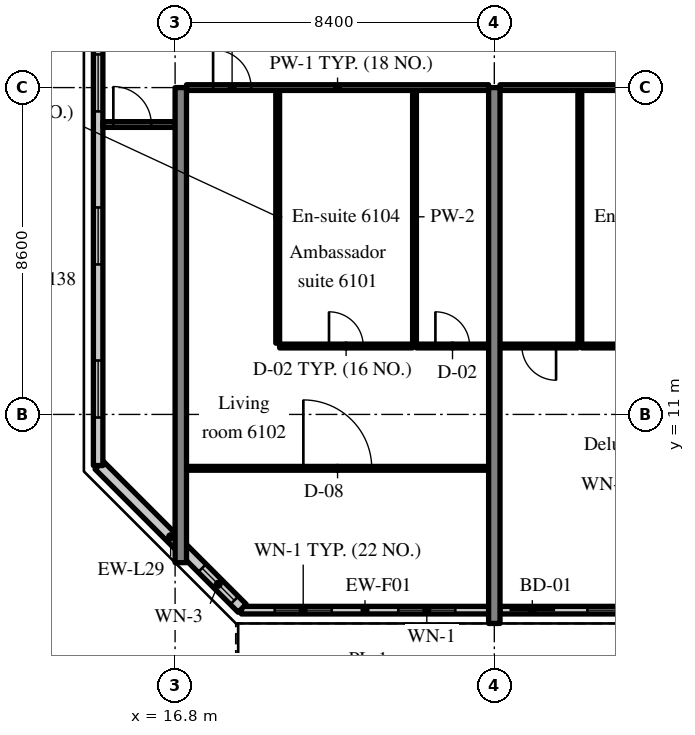
"""IFC4 building model, lengths in metres.
Left out: names, types, materials, properties, quantities, classifications, styles, units other than length and angle.
Written with IfcOpenShell. Run it as: python <this file> out.ifc"""

import sys

from ifc_helpers import new_model, si_unit, direction, frame, frame_2d, origin, place, context, subcontext, project, spatial, rectangle, extrude, source, transform, mapped, element, fill, save


model = new_model("IFC4")
c1 = context("Model", 3, precision=1e-05, world=origin(), true_north=direction((0.0, 1.0)))
c2 = subcontext(c1, "Body", "Model", "MODEL_VIEW")
j1 = project(units=[si_unit("LENGTHUNIT", "METRE"), si_unit("PLANEANGLEUNIT", "RADIAN")], contexts=[c1])
p1 = place(None, origin())
s1 = spatial("IfcSite", under=j1, at=p1, CompositionType="ELEMENT")
p2 = place(p1, origin())
s2 = spatial("IfcBuilding", under=s1, at=p2, CompositionType="ELEMENT")
p3 = place(p2, frame((0.0, 0.0, 253.0)))
s3 = spatial("IfcBuildingStorey", under=s2, at=p3, CompositionType="ELEMENT", Elevation=253.0)
m1 = source(origin(), c2, "Body", "SweptSolid", [
    extrude(rectangle(XDim=12.5, YDim=0.3, at=frame_2d((6.25, 0.0))), origin(), (0.0, 0.0, 1.0), 3.62),
])
p4 = place(p3, frame((16.95, 7.1, 0.0), z_axis=(0.0, 0.0, 1.0), x_axis=(0.0, 1.0, 0.0)))
e1 = element("IfcWall", 1, at=p4, inside=s3, PredefinedType="SHEAR", context=c2, shape_type="MappedRepresentation", body=[
    mapped(m1, transform((0.0, 0.0, 0.0), scale=1.0)),
])
m2 = source(origin(), c2, "Body", "SweptSolid", [
    extrude(rectangle(XDim=14.1, YDim=0.3, at=frame_2d((7.05, 0.0))), origin(), (0.0, 0.0, 1.0), 3.62),
])
p5 = place(p3, frame((25.2, 5.5, 0.0), z_axis=(0.0, 0.0, 1.0), x_axis=(0.0, 1.0, 0.0)))
e2 = element("IfcWall", 2, at=p5, inside=s3, PredefinedType="SHEAR", context=c2, shape_type="MappedRepresentation", body=[
    mapped(m2, transform((0.0, 0.0, 0.0), scale=1.0)),
])
m3 = source(origin(), c2, "Body", "SweptSolid", [
    extrude(rectangle(XDim=6.505, YDim=0.2, at=frame_2d((3.252, 0.0))), origin(), (0.0, 0.0, 1.0), 3.02),
])
p6 = place(p3, frame((18.545, 5.85, 0.0), z_axis=(0.0, 0.0, 1.0), x_axis=(1.0, 0.0, 0.0)))
e3 = element("IfcWall", 3, at=p6, inside=s3, PredefinedType="SOLIDWALL", context=c2, shape_type="MappedRepresentation", body=[
    mapped(m3, transform((0.0, 0.0, 0.0), scale=1.0)),
])
m4 = source(origin(), c2, "Body", "SweptSolid", [
    extrude(rectangle(XDim=1.5, YDim=1.5, at=frame_2d((0.75, 0.75))), frame((0.0, 0.11, 0.0), z_axis=(0.0, -1.0, 0.0), x_axis=(1.0, 0.0, 0.0)), (0.0, 0.0, 1.0), 0.22),
])
p7 = place(p6, frame((0.876, 0.0, 0.9)))
e4 = element("IfcOpeningElement", 4, at=p7, cuts=e3, PredefinedType="OPENING", context=c2, shape_type="MappedRepresentation", body=[
    mapped(m4, transform((0.0, 0.0, 0.0), scale=1.0)),
])
p8 = place(p6, frame((4.129, 0.0, 0.9)))
e5 = element("IfcOpeningElement", 5, at=p8, cuts=e3, PredefinedType="OPENING", context=c2, shape_type="MappedRepresentation", body=[
    mapped(m4, transform((0.0, 0.0, 0.0), scale=1.0)),
])
m5 = source(origin(), c2, "Body", "SweptSolid", [
    extrude(rectangle(XDim=8.1, YDim=0.2, at=frame_2d((4.05, 0.0))), origin(), (0.0, 0.0, 1.0), 3.02),
])
p9 = place(p3, frame((25.35, 5.85, 0.0), z_axis=(0.0, 0.0, 1.0), x_axis=(1.0, 0.0, 0.0)))
e6 = element("IfcWall", 6, at=p9, inside=s3, PredefinedType="SOLIDWALL", context=c2, shape_type="MappedRepresentation", body=[
    mapped(m5, transform((0.0, 0.0, 0.0), scale=1.0)),
])
m6 = source(origin(), c2, "Body", "SweptSolid", [
    extrude(rectangle(XDim=1.2, YDim=2.4, at=frame_2d((0.6, 1.2))), frame((0.0, 0.11, 0.0), z_axis=(0.0, -1.0, 0.0), x_axis=(1.0, 0.0, 0.0)), (0.0, 0.0, 1.0), 0.22),
])
p10 = place(p9, frame((0.25, 0.0, 0.0)))
e7 = element("IfcOpeningElement", 7, at=p10, cuts=e6, PredefinedType="OPENING", context=c2, shape_type="MappedRepresentation", body=[
    mapped(m6, transform((0.0, 0.0, 0.0), scale=1.0)),
])
p11 = place(p9, frame((2.3, 0.0, 0.9)))
e8 = element("IfcOpeningElement", 8, at=p11, cuts=e6, PredefinedType="OPENING", context=c2, shape_type="MappedRepresentation", body=[
    mapped(m4, transform((0.0, 0.0, 0.0), scale=1.0)),
])
p12 = place(p9, frame((4.3, 0.0, 0.0)))
e9 = element("IfcOpeningElement", 9, at=p12, cuts=e6, PredefinedType="OPENING", context=c2, shape_type="MappedRepresentation", body=[
    mapped(m6, transform((0.0, 0.0, 0.0), scale=1.0)),
])
p13 = place(p9, frame((6.35, 0.0, 0.9)))
e10 = element("IfcOpeningElement", 10, at=p13, cuts=e6, PredefinedType="OPENING", context=c2, shape_type="MappedRepresentation", body=[
    mapped(m4, transform((0.0, 0.0, 0.0), scale=1.0)),
])
m7 = source(origin(), c2, "Body", "SweptSolid", [
    extrude(rectangle(XDim=5.326, YDim=0.3, at=frame_2d((2.663, 0.0))), origin(), (0.0, 0.0, 1.0), 3.62),
])
p14 = place(p3, frame((14.8, 9.666, 0.0), z_axis=(0.0, 0.0, 1.0), x_axis=(0.707083859269, -0.707129702361, 0.0)))
e11 = element("IfcWall", 11, at=p14, inside=s3, PredefinedType="SOLIDWALL", context=c2, shape_type="MappedRepresentation", body=[
    mapped(m7, transform((0.0, 0.0, 0.0), scale=1.0)),
])
m8 = source(origin(), c2, "Body", "SweptSolid", [
    extrude(rectangle(XDim=1.2, YDim=1.5, at=frame_2d((0.6, 0.75))), frame((0.0, 0.16, 0.0), z_axis=(0.0, -1.0, 0.0), x_axis=(1.0, 0.0, 0.0)), (0.0, 0.0, 1.0), 0.32),
])
p15 = place(p14, frame((3.833, 0.0, 0.9)))
e12 = element("IfcOpeningElement", 12, at=p15, cuts=e11, PredefinedType="OPENING", context=c2, shape_type="MappedRepresentation", body=[
    mapped(m8, transform((0.0, 0.0, 0.0), scale=1.0)),
])
m9 = source(origin(), c2, "Body", "SweptSolid", [
    extrude(rectangle(XDim=28.189, YDim=0.25, at=frame_2d((14.095, 0.0))), origin(), (0.0, 0.0, 1.0), 3.62),
])
p16 = place(p3, frame((14.775, 37.845, 0.0), z_axis=(0.0, 0.0, 1.0), x_axis=(0.0, -1.0, 0.0)))
e13 = element("IfcWall", 13, at=p16, inside=s3, PredefinedType="SOLIDWALL", context=c2, shape_type="MappedRepresentation", body=[
    mapped(m9, transform((0.0, 0.0, 0.0), scale=1.0)),
])
m10 = source(origin(), c2, "Body", "SweptSolid", [
    extrude(rectangle(XDim=1.5, YDim=1.5, at=frame_2d((0.75, 0.75))), frame((0.0, 0.135, 0.0), z_axis=(0.0, -1.0, 0.0), x_axis=(1.0, 0.0, 0.0)), (0.0, 0.0, 1.0), 0.27),
])
p17 = place(p16, frame((1.263, 0.0, 0.9)))
e14 = element("IfcOpeningElement", 14, at=p17, cuts=e13, PredefinedType="OPENING", context=c2, shape_type="MappedRepresentation", body=[
    mapped(m10, transform((0.0, 0.0, 0.0), scale=1.0)),
])
p18 = place(p16, frame((5.291, 0.0, 0.9)))
e15 = element("IfcOpeningElement", 15, at=p18, cuts=e13, PredefinedType="OPENING", context=c2, shape_type="MappedRepresentation", body=[
    mapped(m10, transform((0.0, 0.0, 0.0), scale=1.0)),
])
p19 = place(p16, frame((9.318, 0.0, 0.9)))
e16 = element("IfcOpeningElement", 16, at=p19, cuts=e13, PredefinedType="OPENING", context=c2, shape_type="MappedRepresentation", body=[
    mapped(m10, transform((0.0, 0.0, 0.0), scale=1.0)),
])
p20 = place(p16, frame((13.345, 0.0, 0.9)))
e17 = element("IfcOpeningElement", 17, at=p20, cuts=e13, PredefinedType="OPENING", context=c2, shape_type="MappedRepresentation", body=[
    mapped(m10, transform((0.0, 0.0, 0.0), scale=1.0)),
])
p21 = place(p16, frame((17.372, 0.0, 0.9)))
e18 = element("IfcOpeningElement", 18, at=p21, cuts=e13, PredefinedType="OPENING", context=c2, shape_type="MappedRepresentation", body=[
    mapped(m10, transform((0.0, 0.0, 0.0), scale=1.0)),
])
p22 = place(p16, frame((21.399, 0.0, 0.9)))
e19 = element("IfcOpeningElement", 19, at=p22, cuts=e13, PredefinedType="OPENING", context=c2, shape_type="MappedRepresentation", body=[
    mapped(m10, transform((0.0, 0.0, 0.0), scale=1.0)),
])
p23 = place(p16, frame((25.426, 0.0, 0.9)))
e20 = element("IfcOpeningElement", 20, at=p23, cuts=e13, PredefinedType="OPENING", context=c2, shape_type="MappedRepresentation", body=[
    mapped(m10, transform((0.0, 0.0, 0.0), scale=1.0)),
])
m11 = source(origin(), c2, "Body", "SweptSolid", [
    extrude(rectangle(XDim=6.65, YDim=0.1, at=frame_2d((3.325, 0.0))), origin(), (0.0, 0.0, 1.0), 3.62),
])
for number, where, z_axis, x_axis in (
    (21, (19.5, 12.875, 0.0), (0.0, 0.0, 1.0), (0.0, 1.0, 0.0)),
    (22, (23.1, 12.875, 0.0), (0.0, 0.0, 1.0), (0.0, 1.0, 0.0)),
):
    element("IfcWall", number, at=place(p3, frame(where, z_axis=z_axis, x_axis=x_axis)), inside=s3, PredefinedType="PARTITIONING", context=c2, shape_type="MappedRepresentation", body=[
        mapped(m11, transform((0.0, 0.0, 0.0), scale=1.0)),
    ])
m12 = source(origin(), c2, "Body", "SweptSolid", [
    extrude(rectangle(XDim=3.5, YDim=0.1, at=frame_2d((1.75, 0.0))), origin(), (0.0, 0.0, 1.0), 3.62),
])
p24 = place(p3, frame((19.55, 12.8, 0.0), z_axis=(0.0, 0.0, 1.0), x_axis=(1.0, 0.0, 0.0)))
e23 = element("IfcWall", 23, at=p24, inside=s3, PredefinedType="PARTITIONING", context=c2, shape_type="MappedRepresentation", body=[
    mapped(m12, transform((0.0, 0.0, 0.0), scale=1.0)),
])
m13 = source(origin(), c2, "Body", "SweptSolid", [
    extrude(rectangle(XDim=0.9, YDim=2.1, at=frame_2d((0.45, 1.05))), frame((0.0, 0.06, 0.0), z_axis=(0.0, -1.0, 0.0), x_axis=(1.0, 0.0, 0.0)), (0.0, 0.0, 1.0), 0.12),
])
p25 = place(p24, frame((1.3, 0.0, 0.0)))
e24 = element("IfcOpeningElement", 24, at=p25, cuts=e23, PredefinedType="OPENING", context=c2, shape_type="MappedRepresentation", body=[
    mapped(m13, transform((0.0, 0.0, 0.0), scale=1.0)),
])
m14 = source(origin(), c2, "Body", "SweptSolid", [
    extrude(rectangle(XDim=1.9, YDim=0.1, at=frame_2d((0.95, 0.0))), origin(), (0.0, 0.0, 1.0), 3.62),
])
p26 = place(p3, frame((23.15, 12.8, 0.0), z_axis=(0.0, 0.0, 1.0), x_axis=(1.0, 0.0, 0.0)))
e25 = element("IfcWall", 25, at=p26, inside=s3, PredefinedType="PARTITIONING", context=c2, shape_type="MappedRepresentation", body=[
    mapped(m14, transform((0.0, 0.0, 0.0), scale=1.0)),
])
p27 = place(p26, frame((0.5, 0.0, 0.0)))
e26 = element("IfcOpeningElement", 26, at=p27, cuts=e25, PredefinedType="OPENING", context=c2, shape_type="MappedRepresentation", body=[
    mapped(m13, transform((0.0, 0.0, 0.0), scale=1.0)),
])
m15 = source(origin(), c2, "Body", "SweptSolid", [
    extrude(rectangle(XDim=7.95, YDim=0.1, at=frame_2d((3.975, 0.0))), origin(), (0.0, 0.0, 1.0), 3.62),
])
p28 = place(p3, frame((17.1, 9.582, 0.0), z_axis=(0.0, 0.0, 1.0), x_axis=(1.0, 0.0, 0.0)))
e27 = element("IfcWall", 27, at=p28, inside=s3, PredefinedType="PARTITIONING", context=c2, shape_type="MappedRepresentation", body=[
    mapped(m15, transform((0.0, 0.0, 0.0), scale=1.0)),
])
m16 = source(origin(), c2, "Body", "SweptSolid", [
    extrude(rectangle(XDim=1.8, YDim=2.1, at=frame_2d((0.9, 1.05))), frame((0.0, 0.06, 0.0), z_axis=(0.0, -1.0, 0.0), x_axis=(1.0, 0.0, 0.0)), (0.0, 0.0, 1.0), 0.12),
])
p29 = place(p28, frame((3.075, 0.0, 0.0)))
e28 = element("IfcOpeningElement", 28, at=p29, cuts=e27, PredefinedType="OPENING", context=c2, shape_type="MappedRepresentation", body=[
    mapped(m16, transform((0.0, 0.0, 0.0), scale=1.0)),
])
m17 = source(origin(), c2, "Body", "SweptSolid", [
    extrude(rectangle(XDim=7.95, YDim=0.15, at=frame_2d((3.975, 0.0))), origin(), (0.0, 0.0, 1.0), 2.92),
])
p30 = place(p3, frame((17.1, 19.6, 0.0), z_axis=(0.0, 0.0, 1.0), x_axis=(1.0, 0.0, 0.0)))
e29 = element("IfcWall", 29, at=p30, inside=s3, PredefinedType="PARTITIONING", context=c2, shape_type="MappedRepresentation", body=[
    mapped(m17, transform((0.0, 0.0, 0.0), scale=1.0)),
])
m18 = source(origin(), c2, "Body", "SweptSolid", [
    extrude(rectangle(XDim=1.0, YDim=2.1, at=frame_2d((0.5, 1.05))), frame((0.0, 0.085, 0.0), z_axis=(0.0, -1.0, 0.0), x_axis=(1.0, 0.0, 0.0)), (0.0, 0.0, 1.0), 0.17),
])
p31 = place(p30, frame((0.7, 0.0, 0.0)))
e30 = element("IfcOpeningElement", 30, at=p31, cuts=e29, PredefinedType="OPENING", context=c2, shape_type="MappedRepresentation", body=[
    mapped(m18, transform((0.0, 0.0, 0.0), scale=1.0)),
])
p32 = place(p3, frame((27.45, 12.875, 0.0), z_axis=(0.0, 0.0, 1.0), x_axis=(0.0, 1.0, 0.0)))
e31 = element("IfcWall", 31, at=p32, inside=s3, PredefinedType="PARTITIONING", context=c2, shape_type="MappedRepresentation", body=[
    mapped(m11, transform((0.0, 0.0, 0.0), scale=1.0)),
])
p33 = place(p3, frame((27.5, 12.8, 0.0), z_axis=(0.0, 0.0, 1.0), x_axis=(1.0, 0.0, 0.0)))
e32 = element("IfcWall", 32, at=p33, inside=s3, PredefinedType="PARTITIONING", context=c2, shape_type="MappedRepresentation", body=[
    mapped(m12, transform((0.0, 0.0, 0.0), scale=1.0)),
])
p34 = place(p33, frame((1.3, 0.0, 0.0)))
e33 = element("IfcOpeningElement", 33, at=p34, cuts=e32, PredefinedType="OPENING", context=c2, shape_type="MappedRepresentation", body=[
    mapped(m13, transform((0.0, 0.0, 0.0), scale=1.0)),
])
m19 = source(origin(), c2, "Body", "SweptSolid", [
    extrude(rectangle(XDim=2.05, YDim=0.1, at=frame_2d((1.025, 0.0))), origin(), (0.0, 0.0, 1.0), 3.62),
])
p35 = place(p3, frame((25.35, 12.8, 0.0), z_axis=(0.0, 0.0, 1.0), x_axis=(1.0, 0.0, 0.0)))
e34 = element("IfcWall", 34, at=p35, inside=s3, PredefinedType="PARTITIONING", context=c2, shape_type="MappedRepresentation", body=[
    mapped(m19, transform((0.0, 0.0, 0.0), scale=1.0)),
])
p36 = place(p35, frame((0.575, 0.0, 0.0)))
e35 = element("IfcOpeningElement", 35, at=p36, cuts=e34, PredefinedType="OPENING", context=c2, shape_type="MappedRepresentation", body=[
    mapped(m13, transform((0.0, 0.0, 0.0), scale=1.0)),
])
m20 = source(origin(), c2, "Body", "SweptSolid", [
    extrude(rectangle(XDim=8.1, YDim=0.15, at=frame_2d((4.05, 0.0))), origin(), (0.0, 0.0, 1.0), 2.92),
])
p37 = place(p3, frame((25.35, 19.6, 0.0), z_axis=(0.0, 0.0, 1.0), x_axis=(1.0, 0.0, 0.0)))
e36 = element("IfcWall", 36, at=p37, inside=s3, PredefinedType="PARTITIONING", context=c2, shape_type="MappedRepresentation", body=[
    mapped(m20, transform((0.0, 0.0, 0.0), scale=1.0)),
])
p38 = place(p37, frame((6.4, 0.0, 0.0)))
e37 = element("IfcOpeningElement", 37, at=p38, cuts=e36, PredefinedType="OPENING", context=c2, shape_type="MappedRepresentation", body=[
    mapped(m18, transform((0.0, 0.0, 0.0), scale=1.0)),
])
m21 = source(origin(), c2, "Body", "SweptSolid", [
    extrude(rectangle(XDim=1.9, YDim=0.15, at=frame_2d((0.95, 0.0))), origin(), (0.0, 0.0, 1.0), 2.92),
])
p39 = place(p3, frame((14.9, 18.628, 0.0), z_axis=(0.0, 0.0, 1.0), x_axis=(1.0, 0.0, 0.0)))
e38 = element("IfcWall", 38, at=p39, inside=s3, PredefinedType="PARTITIONING", context=c2, shape_type="MappedRepresentation", body=[
    mapped(m21, transform((0.0, 0.0, 0.0), scale=1.0)),
])
p40 = place(p39, frame((0.275, 0.0, 0.0)))
e39 = element("IfcOpeningElement", 39, at=p40, cuts=e38, PredefinedType="OPENING", context=c2, shape_type="MappedRepresentation", body=[
    mapped(m18, transform((0.0, 0.0, 0.0), scale=1.0)),
])
m22 = source(origin(), c2, "Body", "SweptSolid", [
    extrude(rectangle(XDim=1.5, YDim=1.5, at=frame_2d((0.75, 0.75))), frame((0.0, 0.03, 0.0), z_axis=(0.0, -1.0, 0.0), x_axis=(1.0, 0.0, 0.0)), (0.0, 0.0, 1.0), 0.06),
])
p41 = place(p7, origin())
e40 = element("IfcWindow", 40, at=p41, inside=s3, PartitioningType="SINGLE_PANEL", PredefinedType="WINDOW", context=c2, shape_type="MappedRepresentation", body=[
    mapped(m22, transform((0.0, 0.0, 0.0), scale=1.0)),
])
fill(e4, e40)
p42 = place(p8, origin())
e41 = element("IfcWindow", 41, at=p42, inside=s3, PartitioningType="SINGLE_PANEL", PredefinedType="WINDOW", context=c2, shape_type="MappedRepresentation", body=[
    mapped(m22, transform((0.0, 0.0, 0.0), scale=1.0)),
])
fill(e5, e41)
m23 = source(origin(), c2, "Body", "SweptSolid", [
    extrude(rectangle(XDim=1.2, YDim=2.4, at=frame_2d((0.6, 1.2))), frame((0.0, 0.025, 0.0), z_axis=(0.0, -1.0, 0.0), x_axis=(1.0, 0.0, 0.0)), (0.0, 0.0, 1.0), 0.05),
])
p43 = place(p10, origin())
e42 = element("IfcDoor", 42, at=p43, inside=s3, OperationType="SLIDING_TO_LEFT", PredefinedType="DOOR", context=c2, shape_type="MappedRepresentation", body=[
    mapped(m23, transform((0.0, 0.0, 0.0), scale=1.0)),
])
fill(e7, e42)
p44 = place(p11, origin())
e43 = element("IfcWindow", 43, at=p44, inside=s3, PartitioningType="SINGLE_PANEL", PredefinedType="WINDOW", context=c2, shape_type="MappedRepresentation", body=[
    mapped(m22, transform((0.0, 0.0, 0.0), scale=1.0)),
])
fill(e8, e43)
m24 = source(origin(), c2, "Body", "SweptSolid", [
    extrude(rectangle(XDim=1.2, YDim=1.5, at=frame_2d((0.6, 0.75))), frame((0.0, 0.03, 0.0), z_axis=(0.0, -1.0, 0.0), x_axis=(1.0, 0.0, 0.0)), (0.0, 0.0, 1.0), 0.06),
])
p45 = place(p15, origin())
e44 = element("IfcWindow", 44, at=p45, inside=s3, PartitioningType="SINGLE_PANEL", PredefinedType="WINDOW", context=c2, shape_type="MappedRepresentation", body=[
    mapped(m24, transform((0.0, 0.0, 0.0), scale=1.0)),
])
fill(e12, e44)
p46 = place(p21, origin())
e45 = element("IfcWindow", 45, at=p46, inside=s3, PartitioningType="SINGLE_PANEL", PredefinedType="WINDOW", context=c2, shape_type="MappedRepresentation", body=[
    mapped(m22, transform((0.0, 0.0, 0.0), scale=1.0)),
])
fill(e18, e45)
p47 = place(p22, origin())
e46 = element("IfcWindow", 46, at=p47, inside=s3, PartitioningType="SINGLE_PANEL", PredefinedType="WINDOW", context=c2, shape_type="MappedRepresentation", body=[
    mapped(m22, transform((0.0, 0.0, 0.0), scale=1.0)),
])
fill(e19, e46)
p48 = place(p23, origin())
e47 = element("IfcWindow", 47, at=p48, inside=s3, PartitioningType="SINGLE_PANEL", PredefinedType="WINDOW", context=c2, shape_type="MappedRepresentation", body=[
    mapped(m22, transform((0.0, 0.0, 0.0), scale=1.0)),
])
fill(e20, e47)
m25 = source(origin(), c2, "Body", "SweptSolid", [
    extrude(rectangle(XDim=0.9, YDim=2.1, at=frame_2d((0.45, 1.05))), frame((0.0, 0.025, 0.0), z_axis=(0.0, -1.0, 0.0), x_axis=(1.0, 0.0, 0.0)), (0.0, 0.0, 1.0), 0.05),
])
p49 = place(p25, origin())
e48 = element("IfcDoor", 48, at=p49, inside=s3, OperationType="SINGLE_SWING_LEFT", PredefinedType="DOOR", context=c2, shape_type="MappedRepresentation", body=[
    mapped(m25, transform((0.0, 0.0, 0.0), scale=1.0)),
])
fill(e24, e48)
p50 = place(p27, origin())
e49 = element("IfcDoor", 49, at=p50, inside=s3, OperationType="SINGLE_SWING_LEFT", PredefinedType="DOOR", context=c2, shape_type="MappedRepresentation", body=[
    mapped(m25, transform((0.0, 0.0, 0.0), scale=1.0)),
])
fill(e26, e49)
m26 = source(origin(), c2, "Body", "SweptSolid", [
    extrude(rectangle(XDim=1.8, YDim=2.1, at=frame_2d((0.9, 1.05))), frame((0.0, 0.025, 0.0), z_axis=(0.0, -1.0, 0.0), x_axis=(1.0, 0.0, 0.0)), (0.0, 0.0, 1.0), 0.05),
])
p51 = place(p29, origin())
e50 = element("IfcDoor", 50, at=p51, inside=s3, OperationType="DOUBLE_DOOR_SINGLE_SWING", PredefinedType="DOOR", context=c2, shape_type="MappedRepresentation", body=[
    mapped(m26, transform((0.0, 0.0, 0.0), scale=1.0)),
])
fill(e28, e50)
m27 = source(origin(), c2, "Body", "SweptSolid", [
    extrude(rectangle(XDim=1.0, YDim=2.1, at=frame_2d((0.5, 1.05))), frame((0.0, 0.025, 0.0), z_axis=(0.0, -1.0, 0.0), x_axis=(1.0, 0.0, 0.0)), (0.0, 0.0, 1.0), 0.05),
])
p52 = place(p31, origin())
e51 = element("IfcDoor", 51, at=p52, inside=s3, OperationType="SINGLE_SWING_LEFT", PredefinedType="DOOR", context=c2, shape_type="MappedRepresentation", body=[
    mapped(m27, transform((0.0, 0.0, 0.0), scale=1.0)),
])
fill(e30, e51)
p53 = place(p36, origin())
e52 = element("IfcDoor", 52, at=p53, inside=s3, OperationType="SINGLE_SWING_RIGHT", PredefinedType="DOOR", context=c2, shape_type="MappedRepresentation", body=[
    mapped(m25, transform((0.0, 0.0, 0.0), scale=1.0)),
])
fill(e35, e52)
p54 = place(p40, origin())
e53 = element("IfcDoor", 53, at=p54, inside=s3, OperationType="SINGLE_SWING_LEFT", PredefinedType="DOOR", context=c2, shape_type="MappedRepresentation", body=[
    mapped(m27, transform((0.0, 0.0, 0.0), scale=1.0)),
])
fill(e39, e53)
save(model, sys.argv[1])
